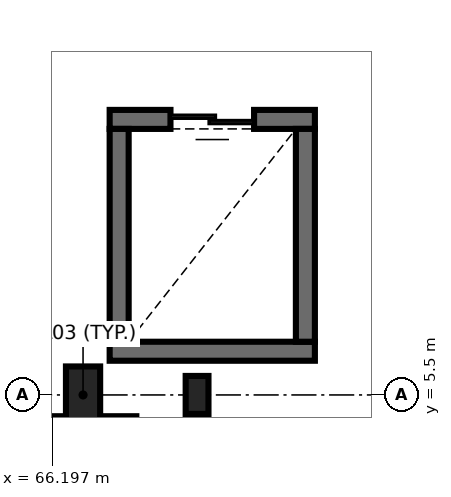
"""IFC4 building model, lengths in metres.
Left out: names, types, materials, properties, quantities, classifications, styles, units other than length and angle.
Written with IfcOpenShell. Run it as: python <this file> out.ifc"""

import sys

from ifc_helpers import new_model, si_unit, direction, frame, frame_2d, origin, origin_2d, place, context, subcontext, project, spatial, rectangle, i_section, extrude, element, fill, save


model = new_model("IFC4")
c1 = context("Model", 3, precision=1e-05, world=origin(), true_north=direction((0.0, 1.0)))
c2 = subcontext(c1, "Body", "Model", "MODEL_VIEW")
j1 = project(units=[si_unit("LENGTHUNIT", "METRE"), si_unit("PLANEANGLEUNIT", "RADIAN")], contexts=[c1])
p1 = place(None, origin())
s1 = spatial("IfcSite", under=j1, at=p1, CompositionType="ELEMENT")
p2 = place(p1, origin())
s2 = spatial("IfcBuilding", under=s1, at=p2, CompositionType="ELEMENT")
p3 = place(p2, frame((0.0, 0.0, 9.3)))
s3 = spatial("IfcBuildingStorey", under=s2, at=p3, CompositionType="ELEMENT", Elevation=9.3)
p4 = place(p3, frame((66.6, 5.5, 0.0), z_axis=(0.0, 0.0, 1.0), x_axis=(1.0, 0.0, 0.0)))
e1 = element("IfcColumn", 1, at=p4, inside=s3, PredefinedType="PILASTER", context=c2, shape_type="SweptSolid", body=[
    extrude(rectangle(XDim=0.45, YDim=0.75, at=origin_2d()), origin(), (0.0, 0.0, 1.0), 4.5),
])
p5 = place(p3, frame((68.1, 5.5, 0.0), z_axis=(0.0, 0.0, 1.0), x_axis=(1.0, 0.0, 0.0)))
e2 = element("IfcColumn", 2, at=p5, inside=s3, PredefinedType="COLUMN", context=c2, shape_type="SweptSolid", body=[
    extrude(i_section(OverallWidth=0.3, OverallDepth=0.5, WebThickness=0.014, FlangeThickness=0.028, FilletRadius=0.027, at=origin_2d()), origin(), (0.0, 0.0, 1.0), 4.5),
])
p6 = place(p3, frame((66.95, 6.075, 0.0), z_axis=(0.0, 0.0, 1.0), x_axis=(1.0, 0.0, 0.0)))
e3 = element("IfcWall", 3, at=p6, inside=s3, PredefinedType="SHEAR", context=c2, shape_type="SweptSolid", body=[
    extrude(rectangle(XDim=2.7, YDim=0.25, at=frame_2d((1.35, 0.0))), origin(), (0.0, 0.0, 1.0), 4.5),
])
p7 = place(p3, frame((69.65, 9.125, 0.0), z_axis=(0.0, 0.0, 1.0), x_axis=(-1.0, 0.0, 0.0)))
e4 = element("IfcWall", 4, at=p7, inside=s3, PredefinedType="SHEAR", context=c2, shape_type="SweptSolid", body=[
    extrude(rectangle(XDim=2.7, YDim=0.25, at=frame_2d((1.35, 0.0))), origin(), (0.0, 0.0, 1.0), 4.5),
])
p8 = place(p7, frame((0.8, 0.0, 0.0)))
e5 = element("IfcOpeningElement", 5, at=p8, cuts=e4, PredefinedType="OPENING", context=c2, shape_type="SweptSolid", body=[
    extrude(rectangle(XDim=1.1, YDim=2.15, at=frame_2d((0.55, 1.075))), frame((0.0, 0.135, 0.0), z_axis=(0.0, -1.0, 0.0), x_axis=(1.0, 0.0, 0.0)), (0.0, 0.0, 1.0), 0.27),
])
for number, where, z_axis, x_axis in (
    (6, (67.075, 9.0, 0.0), (0.0, 0.0, 1.0), (0.0, -1.0, 0.0)),
    (7, (69.525, 6.2, 0.0), (0.0, 0.0, 1.0), (0.0, 1.0, 0.0)),
):
    element("IfcWall", number, at=place(p3, frame(where, z_axis=z_axis, x_axis=x_axis)), inside=s3, PredefinedType="SHEAR", context=c2, shape_type="SweptSolid", body=[
        extrude(rectangle(XDim=2.8, YDim=0.25, at=frame_2d((1.4, 0.0))), origin(), (0.0, 0.0, 1.0), 4.5),
    ])
p9 = place(p3, frame((55.002, 5.06, 0.0), z_axis=(0.0, 0.0, 1.0), x_axis=(1.0, 0.0, 0.0)))
e8 = element("IfcWall", 8, at=p9, inside=s3, PredefinedType="SHEAR", context=c2, shape_type="SweptSolid", body=[
    extrude(rectangle(XDim=12.299, YDim=0.32, at=frame_2d((6.149, 0.0))), origin(), (0.0, 0.0, 1.0), 4.25),
])
p10 = place(p9, frame((8.883, 0.0, 0.9)))
e9 = element("IfcOpeningElement", 9, at=p10, cuts=e8, PredefinedType="OPENING", context=c2, shape_type="SweptSolid", body=[
    extrude(rectangle(XDim=1.2, YDim=1.5, at=frame_2d((0.6, 0.75))), frame((0.0, 0.17, 0.0), z_axis=(0.0, -1.0, 0.0), x_axis=(1.0, 0.0, 0.0)), (0.0, 0.0, 1.0), 0.34),
])
p11 = place(p8, origin())
e10 = element("IfcDoor", 10, at=p11, inside=s3, OperationType="DOUBLE_DOOR_SLIDING", PredefinedType="DOOR", context=c2, shape_type="SweptSolid", body=[
    extrude(rectangle(XDim=1.1, YDim=2.15, at=frame_2d((0.55, 1.075))), frame((0.0, 0.025, 0.0), z_axis=(0.0, -1.0, 0.0), x_axis=(1.0, 0.0, 0.0)), (0.0, 0.0, 1.0), 0.05),
])
fill(e5, e10)
save(model, sys.argv[1])
